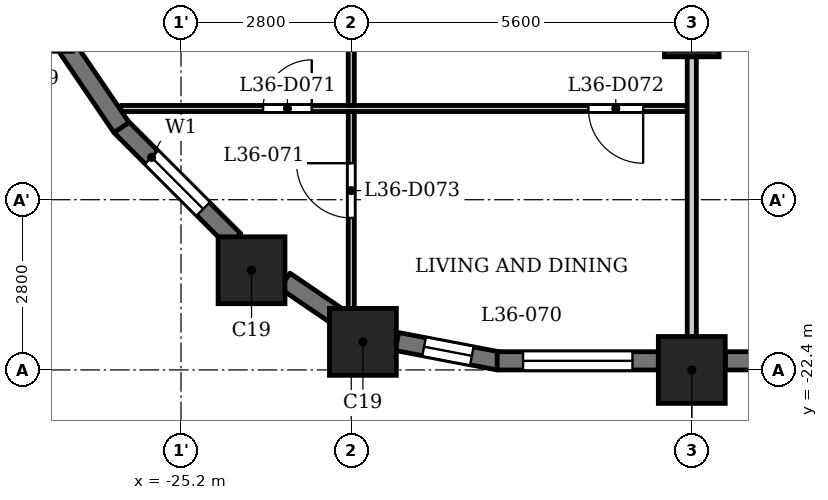
"""IFC4 building model, lengths in metres.
Left out: names, types, materials, properties, quantities, classifications, styles, units other than length and angle.
Written with IfcOpenShell. Run it as: python <this file> out.ifc"""

import sys

from ifc_helpers import new_model, si_unit, direction, frame, frame_2d, origin, origin_2d, place, context, subcontext, project, spatial, rectangle, extrude, element, fill, save


model = new_model("IFC4")
c1 = context("Model", 3, precision=1e-05, world=origin(), true_north=direction((0.0, 1.0)))
c2 = subcontext(c1, "Body", "Model", "MODEL_VIEW")
j1 = project(units=[si_unit("LENGTHUNIT", "METRE"), si_unit("PLANEANGLEUNIT", "RADIAN")], contexts=[c1])
p1 = place(None, origin())
s1 = spatial("IfcSite", under=j1, at=p1, CompositionType="ELEMENT")
p2 = place(p1, origin())
s2 = spatial("IfcBuilding", under=s1, at=p2, CompositionType="ELEMENT")
p3 = place(p2, frame((0.0, 0.0, 143.1)))
s3 = spatial("IfcBuildingStorey", under=s2, at=p3, CompositionType="ELEMENT", Elevation=143.1)
for number, where, z_axis, x_axis in (
    (1, (-22.209, -21.938, 0.0), (0.0, 0.0, 1.0), (1.0, 0.0, 0.0)),
    (2, (-16.8, -22.4, 0.0), (0.0, 0.0, 1.0), (1.0, 0.0, 0.0)),
    (3, (-24.04, -20.76, 0.0), (0.0, 0.0, 1.0), (1.0, 0.0, 0.0)),
):
    element("IfcColumn", number, at=place(p3, frame(where, z_axis=z_axis, x_axis=x_axis)), inside=s3, PredefinedType="COLUMN", context=c2, shape_type="SweptSolid", body=[
        extrude(rectangle(XDim=1.1, YDim=1.1, at=origin_2d()), origin(), (0.0, 0.0, 1.0), 3.5),
    ])
p4 = place(p3, frame((-16.8, -16.8, 0.0), z_axis=(0.0, 0.0, 1.0), x_axis=(1.0, 0.0, 0.0)))
e4 = element("IfcColumn", 4, at=p4, inside=s3, PredefinedType="COLUMN", context=c2, shape_type="SweptSolid", body=[
    extrude(rectangle(XDim=0.9, YDim=0.9, at=origin_2d()), origin(), (0.0, 0.0, 1.0), 3.5),
])
p5 = place(p3, frame((-26.197, -18.391, 0.0), z_axis=(0.0, 0.0, 1.0), x_axis=(0.707060717099, -0.707152842274, 0.0)))
e5 = element("IfcWall", 5, at=p5, inside=s3, PredefinedType="SOLIDWALL", context=c2, shape_type="SweptSolid", body=[
    extrude(rectangle(XDim=2.65, YDim=0.3, at=frame_2d((1.325, 0.0))), origin(), (0.0, 0.0, 1.0), 2.45),
])
p6 = place(p5, frame((0.725, 0.0, 0.6)))
e6 = element("IfcOpeningElement", 6, at=p6, cuts=e5, PredefinedType="OPENING", context=c2, shape_type="SweptSolid", body=[
    extrude(rectangle(XDim=1.2, YDim=1.55, at=frame_2d((0.6, 0.775))), frame((0.0, 0.16, 0.0), z_axis=(0.0, -1.0, 0.0), x_axis=(1.0, 0.0, 0.0)), (0.0, 0.0, 1.0), 0.32),
])
p7 = place(p3, frame((-23.492, -20.932, 0.0), z_axis=(0.0, 0.0, 1.0), x_axis=(0.826993959827, -0.562210806023, 0.0)))
e7 = element("IfcWall", 7, at=p7, inside=s3, PredefinedType="SOLIDWALL", context=c2, shape_type="SweptSolid", body=[
    extrude(rectangle(XDim=1.077, YDim=0.3, at=frame_2d((0.539, 0.0))), origin(), (0.0, 0.0, 1.0), 3.2),
])
p8 = place(p3, frame((-21.648, -21.933, 0.0), z_axis=(0.0, 0.0, 1.0), x_axis=(0.982297206936, -0.187329114784, 0.0)))
e8 = element("IfcWall", 8, at=p8, inside=s3, PredefinedType="SOLIDWALL", context=c2, shape_type="SweptSolid", body=[
    extrude(rectangle(XDim=1.706, YDim=0.3, at=frame_2d((0.853, 0.0))), origin(), (0.0, 0.0, 1.0), 2.45),
])
p9 = place(p8, frame((0.453, 0.0, 0.6)))
e9 = element("IfcOpeningElement", 9, at=p9, cuts=e8, PredefinedType="OPENING", context=c2, shape_type="SweptSolid", body=[
    extrude(rectangle(XDim=0.8, YDim=1.55, at=frame_2d((0.4, 0.775))), frame((0.0, 0.16, 0.0), z_axis=(0.0, -1.0, 0.0), x_axis=(1.0, 0.0, 0.0)), (0.0, 0.0, 1.0), 0.32),
])
p10 = place(p3, frame((-20.0, -22.25, 0.0), z_axis=(0.0, 0.0, 1.0), x_axis=(1.0, 0.0, 0.0)))
e10 = element("IfcWall", 10, at=p10, inside=s3, PredefinedType="SOLIDWALL", context=c2, shape_type="SweptSolid", body=[
    extrude(rectangle(XDim=2.65, YDim=0.3, at=frame_2d((1.325, 0.0))), origin(), (0.0, 0.0, 1.0), 2.45),
])
p11 = place(p10, frame((0.425, 0.0, 0.9)))
e11 = element("IfcOpeningElement", 11, at=p11, cuts=e10, PredefinedType="OPENING", context=c2, shape_type="SweptSolid", body=[
    extrude(rectangle(XDim=1.8, YDim=1.25, at=frame_2d((0.9, 0.625))), frame((0.0, 0.16, 0.0), z_axis=(0.0, -1.0, 0.0), x_axis=(1.0, 0.0, 0.0)), (0.0, 0.0, 1.0), 0.32),
])
p12 = place(p3, frame((-16.25, -22.25, 0.0), z_axis=(0.0, 0.0, 1.0), x_axis=(1.0, 0.0, 0.0)))
e12 = element("IfcWall", 12, at=p12, inside=s3, PredefinedType="SOLIDWALL", context=c2, shape_type="SweptSolid", body=[
    extrude(rectangle(XDim=4.5, YDim=0.3, at=frame_2d((2.25, 0.0))), origin(), (0.0, 0.0, 1.0), 2.45),
])
p13 = place(p12, frame((0.45, 0.0, 1.2)))
e13 = element("IfcOpeningElement", 13, at=p13, cuts=e12, PredefinedType="OPENING", context=c2, shape_type="SweptSolid", body=[
    extrude(rectangle(XDim=3.6, YDim=0.95, at=frame_2d((1.8, 0.475))), frame((0.0, 0.16, 0.0), z_axis=(0.0, -1.0, 0.0), x_axis=(1.0, 0.0, 0.0)), (0.0, 0.0, 1.0), 0.32),
])
p14 = place(p3, frame((-27.138, -17.002, 0.0), z_axis=(0.0, 0.0, 1.0), x_axis=(0.562075160946, -0.827086158419, 0.0)))
e14 = element("IfcWall", 14, at=p14, inside=s3, PredefinedType="SOLIDWALL", context=c2, shape_type="SweptSolid", body=[
    extrude(rectangle(XDim=1.706, YDim=0.3, at=frame_2d((0.853, 0.0))), origin(), (0.0, 0.0, 1.0), 2.45),
])
p15 = place(p3, frame((-26.19, -18.1, 0.0), z_axis=(0.0, 0.0, 1.0), x_axis=(1.0, 0.0, 0.0)))
e15 = element("IfcWall", 15, at=p15, inside=s3, PredefinedType="PARTITIONING", context=c2, shape_type="SweptSolid", body=[
    extrude(rectangle(XDim=9.315, YDim=0.1, at=frame_2d((4.658, 0.0))), origin(), (0.0, 0.0, 1.0), 3.2),
])
p16 = place(p15, frame((2.34, 0.0, 0.0)))
e16 = element("IfcOpeningElement", 16, at=p16, cuts=e15, PredefinedType="OPENING", context=c2, shape_type="SweptSolid", body=[
    extrude(rectangle(XDim=0.8, YDim=2.1, at=frame_2d((0.4, 1.05))), frame((0.0, 0.06, 0.0), z_axis=(0.0, -1.0, 0.0), x_axis=(1.0, 0.0, 0.0)), (0.0, 0.0, 1.0), 0.12),
])
p17 = place(p15, frame((7.69, 0.0, 0.0)))
e17 = element("IfcOpeningElement", 17, at=p17, cuts=e15, PredefinedType="OPENING", context=c2, shape_type="SweptSolid", body=[
    extrude(rectangle(XDim=0.9, YDim=2.1, at=frame_2d((0.45, 1.05))), frame((0.0, 0.06, 0.0), z_axis=(0.0, -1.0, 0.0), x_axis=(1.0, 0.0, 0.0)), (0.0, 0.0, 1.0), 0.12),
])
p18 = place(p3, frame((-22.4, -21.72, 0.0), z_axis=(0.0, 0.0, 1.0), x_axis=(0.0, 1.0, 0.0)))
e18 = element("IfcWall", 18, at=p18, inside=s3, PredefinedType="PARTITIONING", context=c2, shape_type="SweptSolid", body=[
    extrude(rectangle(XDim=3.57, YDim=0.1, at=frame_2d((1.785, 0.0))), origin(), (0.0, 0.0, 1.0), 3.2),
])
p19 = place(p18, frame((1.82, 0.0, 0.0)))
e19 = element("IfcOpeningElement", 19, at=p19, cuts=e18, PredefinedType="OPENING", context=c2, shape_type="SweptSolid", body=[
    extrude(rectangle(XDim=0.9, YDim=2.1, at=frame_2d((0.45, 1.05))), frame((0.0, 0.06, 0.0), z_axis=(0.0, -1.0, 0.0), x_axis=(1.0, 0.0, 0.0)), (0.0, 0.0, 1.0), 0.12),
])
p20 = place(p3, frame((-22.4, -18.05, 0.0), z_axis=(0.0, 0.0, 1.0), x_axis=(0.0, 1.0, 0.0)))
e20 = element("IfcWall", 20, at=p20, inside=s3, PredefinedType="PARTITIONING", context=c2, shape_type="SweptSolid", body=[
    extrude(rectangle(XDim=2.575, YDim=0.1, at=frame_2d((1.288, 0.0))), origin(), (0.0, 0.0, 1.0), 3.2),
])
p21 = place(p3, frame((-16.8, -22.93, 0.0), z_axis=(0.0, 0.0, 1.0), x_axis=(0.0, 1.0, 0.0)))
e21 = element("IfcWall", 21, at=p21, inside=s3, PredefinedType="PARTITIONING", context=c2, shape_type="SweptSolid", body=[
    extrude(rectangle(XDim=7.455, YDim=0.15, at=frame_2d((3.728, 0.0))), origin(), (0.0, 0.0, 1.0), 3.2),
])
p22 = place(p16, origin())
e22 = element("IfcDoor", 22, at=p22, inside=s3, OperationType="SINGLE_SWING_LEFT", PredefinedType="DOOR", context=c2, shape_type="SweptSolid", body=[
    extrude(rectangle(XDim=0.8, YDim=2.1, at=frame_2d((0.4, 1.05))), frame((0.0, 0.025, 0.0), z_axis=(0.0, -1.0, 0.0), x_axis=(1.0, 0.0, 0.0)), (0.0, 0.0, 1.0), 0.05),
])
fill(e16, e22)
p23 = place(p17, origin())
e23 = element("IfcDoor", 23, at=p23, inside=s3, OperationType="SINGLE_SWING_RIGHT", PredefinedType="DOOR", context=c2, shape_type="SweptSolid", body=[
    extrude(rectangle(XDim=0.9, YDim=2.1, at=frame_2d((0.45, 1.05))), frame((0.0, 0.025, 0.0), z_axis=(0.0, -1.0, 0.0), x_axis=(1.0, 0.0, 0.0)), (0.0, 0.0, 1.0), 0.05),
])
fill(e17, e23)
p24 = place(p19, origin())
e24 = element("IfcDoor", 24, at=p24, inside=s3, OperationType="SINGLE_SWING_LEFT", PredefinedType="DOOR", context=c2, shape_type="SweptSolid", body=[
    extrude(rectangle(XDim=0.9, YDim=2.1, at=frame_2d((0.45, 1.05))), frame((0.0, 0.025, 0.0), z_axis=(0.0, -1.0, 0.0), x_axis=(1.0, 0.0, 0.0)), (0.0, 0.0, 1.0), 0.05),
])
fill(e19, e24)
p25 = place(p6, origin())
e25 = element("IfcWindow", 25, at=p25, inside=s3, PartitioningType="SINGLE_PANEL", PredefinedType="WINDOW", context=c2, shape_type="SweptSolid", body=[
    extrude(rectangle(XDim=1.2, YDim=1.55, at=frame_2d((0.6, 0.775))), frame((0.0, 0.03, 0.0), z_axis=(0.0, -1.0, 0.0), x_axis=(1.0, 0.0, 0.0)), (0.0, 0.0, 1.0), 0.06),
])
fill(e6, e25)
p26 = place(p9, origin())
e26 = element("IfcWindow", 26, at=p26, inside=s3, PartitioningType="SINGLE_PANEL", PredefinedType="WINDOW", context=c2, shape_type="SweptSolid", body=[
    extrude(rectangle(XDim=0.8, YDim=1.55, at=frame_2d((0.4, 0.775))), frame((0.0, 0.03, 0.0), z_axis=(0.0, -1.0, 0.0), x_axis=(1.0, 0.0, 0.0)), (0.0, 0.0, 1.0), 0.06),
])
fill(e9, e26)
p27 = place(p11, origin())
e27 = element("IfcWindow", 27, at=p27, inside=s3, PartitioningType="SINGLE_PANEL", PredefinedType="WINDOW", context=c2, shape_type="SweptSolid", body=[
    extrude(rectangle(XDim=1.8, YDim=1.25, at=frame_2d((0.9, 0.625))), frame((0.0, 0.03, 0.0), z_axis=(0.0, -1.0, 0.0), x_axis=(1.0, 0.0, 0.0)), (0.0, 0.0, 1.0), 0.06),
])
fill(e11, e27)
save(model, sys.argv[1])
